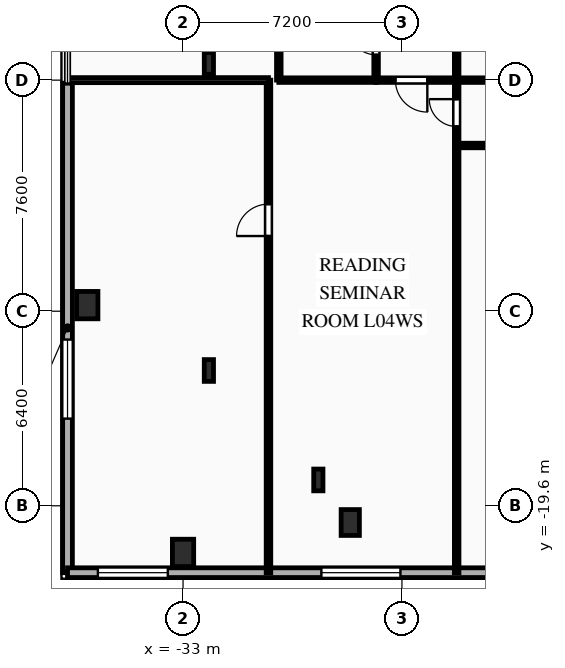
"""IFC4 building model, lengths in metres.
Left out: names, types, materials, properties, quantities, classifications, styles, units other than length and angle.
Written with IfcOpenShell. Run it as: python <this file> out.ifc"""

import sys

from ifc_helpers import new_model, si_unit, direction, frame, frame_2d, origin, origin_2d, place, context, subcontext, project, spatial, rectangle, i_section, extrude, element, fill, save


model = new_model("IFC4")
c1 = context("Model", 3, precision=1e-05, world=origin(), true_north=direction((0.0, 1.0)))
c2 = subcontext(c1, "Body", "Model", "MODEL_VIEW")
j1 = project(units=[si_unit("LENGTHUNIT", "METRE"), si_unit("PLANEANGLEUNIT", "RADIAN")], contexts=[c1])
p1 = place(None, origin())
s1 = spatial("IfcSite", under=j1, at=p1, CompositionType="ELEMENT")
p2 = place(p1, origin())
s2 = spatial("IfcBuilding", under=s1, at=p2, CompositionType="ELEMENT")
p3 = place(p2, frame((0.0, 0.0, 18.0)))
s3 = spatial("IfcBuildingStorey", under=s2, at=p3, CompositionType="ELEMENT", Elevation=18.0)
for number, where, z_axis, x_axis in (
    (1, (-33.0, -21.15, 0.0), (0.0, 0.0, 1.0), (1.0, 0.0, 0.0)),
    (2, (-36.15, -13.0, 0.0), (0.0, 0.0, 1.0), (1.0, 0.0, 0.0)),
):
    element("IfcColumn", number, at=place(p3, frame(where, z_axis=z_axis, x_axis=x_axis)), inside=s3, PredefinedType="COLUMN", context=c2, shape_type="SweptSolid", body=[
        extrude(rectangle(XDim=0.7, YDim=0.9, at=origin_2d()), origin(), (0.0, 0.0, 1.0), 4.5),
    ])
p4 = place(p3, frame((-27.5, -20.15, 0.0), z_axis=(0.0, 0.0, 1.0), x_axis=(1.0, 0.0, 0.0)))
e3 = element("IfcColumn", 3, at=p4, inside=s3, PredefinedType="PILASTER", context=c2, shape_type="SweptSolid", body=[
    extrude(rectangle(XDim=0.6, YDim=0.85, at=origin_2d()), origin(), (0.0, 0.0, 1.0), 4.5),
])
for number, where, z_axis, x_axis in (
    (4, (-28.55, -18.75, 0.0), (0.0, 0.0, 1.0), (1.0, 0.0, 0.0)),
    (5, (-32.15, -5.05, 0.0), (0.0, 0.0, 1.0), (1.0, 0.0, 0.0)),
    (6, (-32.15, -15.15, 0.0), (0.0, 0.0, 1.0), (1.0, 0.0, 0.0)),
):
    element("IfcColumn", number, at=place(p3, frame(where, z_axis=z_axis, x_axis=x_axis)), inside=s3, PredefinedType="COLUMN", context=c2, shape_type="SweptSolid", body=[
        extrude(i_section(OverallWidth=0.304, OverallDepth=0.716, WebThickness=0.021, FlangeThickness=0.04, FilletRadius=0.027, at=origin_2d()), origin(), (0.0, 0.0, 1.0), 4.5),
    ])
p5 = place(p3, frame((-36.8, -21.8, 0.0), z_axis=(0.0, 0.0, 1.0), x_axis=(0.0, 1.0, 0.0)))
e7 = element("IfcWall", 7, at=p5, inside=s3, PredefinedType="SOLIDWALL", context=c2, shape_type="SweptSolid", body=[
    extrude(rectangle(XDim=16.1, YDim=0.32, at=frame_2d((8.05, 0.0))), origin(), (0.0, 0.0, 1.0), 4.17),
])
p6 = place(p5, frame((5.067, 0.0, 0.85)))
e8 = element("IfcOpeningElement", 8, at=p6, cuts=e7, PredefinedType="OPENING", context=c2, shape_type="SweptSolid", body=[
    extrude(rectangle(XDim=2.6, YDim=2.4, at=frame_2d((1.3, 1.2))), frame((0.0, 0.17, 0.0), z_axis=(0.0, -1.0, 0.0), x_axis=(1.0, 0.0, 0.0)), (0.0, 0.0, 1.0), 0.34),
])
p7 = place(p3, frame((36.8, -21.8, 0.0), z_axis=(0.0, 0.0, 1.0), x_axis=(-1.0, 0.0, 0.0)))
e9 = element("IfcWall", 9, at=p7, inside=s3, PredefinedType="SOLIDWALL", context=c2, shape_type="SweptSolid", body=[
    extrude(rectangle(XDim=73.6, YDim=0.32, at=frame_2d((36.8, 0.0))), origin(), (0.0, 0.0, 1.0), 4.17),
])
p8 = place(p7, frame((1.079, 0.0, 0.85)))
e10 = element("IfcOpeningElement", 10, at=p8, cuts=e9, PredefinedType="OPENING", context=c2, shape_type="SweptSolid", body=[
    extrude(rectangle(XDim=2.3, YDim=2.4, at=frame_2d((1.15, 1.2))), frame((0.0, 0.17, 0.0), z_axis=(0.0, -1.0, 0.0), x_axis=(1.0, 0.0, 0.0)), (0.0, 0.0, 1.0), 0.34),
])
p9 = place(p7, frame((8.431, 0.0, 0.85)))
e11 = element("IfcOpeningElement", 11, at=p9, cuts=e9, PredefinedType="OPENING", context=c2, shape_type="SweptSolid", body=[
    extrude(rectangle(XDim=2.6, YDim=2.4, at=frame_2d((1.3, 1.2))), frame((0.0, 0.17, 0.0), z_axis=(0.0, -1.0, 0.0), x_axis=(1.0, 0.0, 0.0)), (0.0, 0.0, 1.0), 0.34),
])
p10 = place(p7, frame((13.324, 0.0, 0.85)))
e12 = element("IfcOpeningElement", 12, at=p10, cuts=e9, PredefinedType="OPENING", context=c2, shape_type="SweptSolid", body=[
    extrude(rectangle(XDim=1.1, YDim=1.85, at=frame_2d((0.55, 0.925))), frame((0.0, 0.17, 0.0), z_axis=(0.0, -1.0, 0.0), x_axis=(1.0, 0.0, 0.0)), (0.0, 0.0, 1.0), 0.34),
])
p11 = place(p7, frame((16.619, 0.0, 0.85)))
e13 = element("IfcOpeningElement", 13, at=p11, cuts=e9, PredefinedType="OPENING", context=c2, shape_type="SweptSolid", body=[
    extrude(rectangle(XDim=2.0, YDim=2.4, at=frame_2d((1.0, 1.2))), frame((0.0, 0.17, 0.0), z_axis=(0.0, -1.0, 0.0), x_axis=(1.0, 0.0, 0.0)), (0.0, 0.0, 1.0), 0.34),
])
p12 = place(p7, frame((21.125, 0.0, 0.85)))
e14 = element("IfcOpeningElement", 14, at=p12, cuts=e9, PredefinedType="OPENING", context=c2, shape_type="SweptSolid", body=[
    extrude(rectangle(XDim=2.6, YDim=2.4, at=frame_2d((1.3, 1.2))), frame((0.0, 0.17, 0.0), z_axis=(0.0, -1.0, 0.0), x_axis=(1.0, 0.0, 0.0)), (0.0, 0.0, 1.0), 0.34),
])
p13 = place(p7, frame((27.531, 0.0, 0.85)))
e15 = element("IfcOpeningElement", 15, at=p13, cuts=e9, PredefinedType="OPENING", context=c2, shape_type="SweptSolid", body=[
    extrude(rectangle(XDim=2.6, YDim=2.4, at=frame_2d((1.3, 1.2))), frame((0.0, 0.17, 0.0), z_axis=(0.0, -1.0, 0.0), x_axis=(1.0, 0.0, 0.0)), (0.0, 0.0, 1.0), 0.34),
])
p14 = place(p7, frame((33.474, 0.0, 0.85)))
e16 = element("IfcOpeningElement", 16, at=p14, cuts=e9, PredefinedType="OPENING", context=c2, shape_type="SweptSolid", body=[
    extrude(rectangle(XDim=2.6, YDim=2.4, at=frame_2d((1.3, 1.2))), frame((0.0, 0.17, 0.0), z_axis=(0.0, -1.0, 0.0), x_axis=(1.0, 0.0, 0.0)), (0.0, 0.0, 1.0), 0.34),
])
p15 = place(p7, frame((41.427, 0.0, 0.85)))
e17 = element("IfcOpeningElement", 17, at=p15, cuts=e9, PredefinedType="OPENING", context=c2, shape_type="SweptSolid", body=[
    extrude(rectangle(XDim=2.6, YDim=2.4, at=frame_2d((1.3, 1.2))), frame((0.0, 0.17, 0.0), z_axis=(0.0, -1.0, 0.0), x_axis=(1.0, 0.0, 0.0)), (0.0, 0.0, 1.0), 0.34),
])
p16 = place(p7, frame((48.177, 0.0, 0.85)))
e18 = element("IfcOpeningElement", 18, at=p16, cuts=e9, PredefinedType="OPENING", context=c2, shape_type="SweptSolid", body=[
    extrude(rectangle(XDim=2.0, YDim=2.4, at=frame_2d((1.0, 1.2))), frame((0.0, 0.17, 0.0), z_axis=(0.0, -1.0, 0.0), x_axis=(1.0, 0.0, 0.0)), (0.0, 0.0, 1.0), 0.34),
])
p17 = place(p7, frame((51.798, 0.0, 0.85)))
e19 = element("IfcOpeningElement", 19, at=p17, cuts=e9, PredefinedType="OPENING", context=c2, shape_type="SweptSolid", body=[
    extrude(rectangle(XDim=2.6, YDim=2.4, at=frame_2d((1.3, 1.2))), frame((0.0, 0.17, 0.0), z_axis=(0.0, -1.0, 0.0), x_axis=(1.0, 0.0, 0.0)), (0.0, 0.0, 1.0), 0.34),
])
p18 = place(p7, frame((56.111, 0.0, 0.85)))
e20 = element("IfcOpeningElement", 20, at=p18, cuts=e9, PredefinedType="OPENING", context=c2, shape_type="SweptSolid", body=[
    extrude(rectangle(XDim=2.3, YDim=2.4, at=frame_2d((1.15, 1.2))), frame((0.0, 0.17, 0.0), z_axis=(0.0, -1.0, 0.0), x_axis=(1.0, 0.0, 0.0)), (0.0, 0.0, 1.0), 0.34),
])
p19 = place(p7, frame((62.649, 0.0, 0.85)))
e21 = element("IfcOpeningElement", 21, at=p19, cuts=e9, PredefinedType="OPENING", context=c2, shape_type="SweptSolid", body=[
    extrude(rectangle(XDim=2.6, YDim=2.4, at=frame_2d((1.3, 1.2))), frame((0.0, 0.17, 0.0), z_axis=(0.0, -1.0, 0.0), x_axis=(1.0, 0.0, 0.0)), (0.0, 0.0, 1.0), 0.34),
])
p20 = place(p7, frame((70.301, 0.0, 0.85)))
e22 = element("IfcOpeningElement", 22, at=p20, cuts=e9, PredefinedType="OPENING", context=c2, shape_type="SweptSolid", body=[
    extrude(rectangle(XDim=2.3, YDim=2.4, at=frame_2d((1.15, 1.2))), frame((0.0, 0.17, 0.0), z_axis=(0.0, -1.0, 0.0), x_axis=(1.0, 0.0, 0.0)), (0.0, 0.0, 1.0), 0.34),
])
p21 = place(p3, frame((-24.0, -7.75, 0.0), z_axis=(0.0, 0.0, 1.0), x_axis=(0.0, 1.0, 0.0)))
e23 = element("IfcWall", 23, at=p21, inside=s3, PredefinedType="PARTITIONING", context=c2, shape_type="SweptSolid", body=[
    extrude(rectangle(XDim=2.15, YDim=0.15, at=frame_2d((1.075, 0.0))), origin(), (0.0, 0.0, 1.0), 4.17),
])
p22 = place(p21, frame((0.625, 0.0, 0.0)))
e24 = element("IfcOpeningElement", 24, at=p22, cuts=e23, PredefinedType="OPENING", context=c2, shape_type="SweptSolid", body=[
    extrude(rectangle(XDim=0.9, YDim=2.1, at=frame_2d((0.45, 1.05))), frame((0.0, 0.085, 0.0), z_axis=(0.0, -1.0, 0.0), x_axis=(1.0, 0.0, 0.0)), (0.0, 0.0, 1.0), 0.17),
])
p23 = place(p3, frame((-24.0, -5.6, 0.0), z_axis=(0.0, 0.0, 1.0), x_axis=(1.0, 0.0, 0.0)))
e25 = element("IfcWall", 25, at=p23, inside=s3, PredefinedType="PARTITIONING", context=c2, shape_type="SweptSolid", body=[
    extrude(rectangle(XDim=5.2, YDim=0.15, at=frame_2d((2.6, 0.0))), origin(), (0.0, 0.0, 1.0), 4.17),
])
p24 = place(p3, frame((-18.83, -7.75, 0.0), z_axis=(0.0, 0.0, 1.0), x_axis=(-1.0, 0.0, 0.0)))
e26 = element("IfcWall", 26, at=p24, inside=s3, PredefinedType="PARTITIONING", context=c2, shape_type="SweptSolid", body=[
    extrude(rectangle(XDim=5.17, YDim=0.15, at=frame_2d((2.585, 0.0))), origin(), (0.0, 0.0, 1.0), 4.17),
])
p25 = place(p24, frame((3.17, 0.0, 0.0)))
e27 = element("IfcOpeningElement", 27, at=p25, cuts=e26, PredefinedType="OPENING", context=c2, shape_type="SweptSolid", body=[
    extrude(rectangle(XDim=1.05, YDim=2.15, at=frame_2d((0.525, 1.075))), frame((0.0, 0.085, 0.0), z_axis=(0.0, -1.0, 0.0), x_axis=(1.0, 0.0, 0.0)), (0.0, 0.0, 1.0), 0.17),
])
p26 = place(p3, frame((-24.0, -5.6, 0.0), z_axis=(0.0, 0.0, 1.0), x_axis=(-1.0, 0.0, 0.0)))
e28 = element("IfcWall", 28, at=p26, inside=s3, PredefinedType="PARTITIONING", context=c2, shape_type="SweptSolid", body=[
    extrude(rectangle(XDim=2.65, YDim=0.15, at=frame_2d((1.325, 0.0))), origin(), (0.0, 0.0, 1.0), 4.17),
])
p27 = place(p26, frame((0.965, 0.0, 0.0)))
e29 = element("IfcOpeningElement", 29, at=p27, cuts=e28, PredefinedType="OPENING", context=c2, shape_type="SweptSolid", body=[
    extrude(rectangle(XDim=1.05, YDim=2.15, at=frame_2d((0.525, 1.075))), frame((0.0, 0.085, 0.0), z_axis=(0.0, -1.0, 0.0), x_axis=(1.0, 0.0, 0.0)), (0.0, 0.0, 1.0), 0.17),
])
p28 = place(p3, frame((-26.65, -5.6, 0.0), z_axis=(0.0, 0.0, 1.0), x_axis=(0.0, 1.0, 0.0)))
e30 = element("IfcWall", 30, at=p28, inside=s3, PredefinedType="PLUMBINGWALL", context=c2, shape_type="SweptSolid", body=[
    extrude(rectangle(XDim=2.35, YDim=0.15, at=frame_2d((1.175, 0.0))), origin(), (0.0, 0.0, 1.0), 4.17),
])
p29 = place(p28, frame((0.834, 0.0, 0.0)))
e31 = element("IfcOpeningElement", 31, at=p29, cuts=e30, PredefinedType="OPENING", context=c2, shape_type="SweptSolid", body=[
    extrude(rectangle(XDim=0.9, YDim=2.1, at=frame_2d((0.45, 1.05))), frame((0.0, 0.085, 0.0), z_axis=(0.0, -1.0, 0.0), x_axis=(1.0, 0.0, 0.0)), (0.0, 0.0, 1.0), 0.17),
])
p30 = place(p3, frame((-24.0, 8.5, 0.0), z_axis=(0.0, 0.0, 1.0), x_axis=(0.0, -1.0, 0.0)))
e32 = element("IfcWall", 32, at=p30, inside=s3, PredefinedType="PARTITIONING", context=c2, shape_type="SweptSolid", body=[
    extrude(rectangle(XDim=14.1, YDim=0.15, at=frame_2d((7.05, 0.0))), origin(), (0.0, 0.0, 1.0), 4.17),
])
p31 = place(p3, frame((-30.19, -21.8, 0.0), z_axis=(0.0, 0.0, 1.0), x_axis=(0.0, 1.0, 0.0)))
e33 = element("IfcWall", 33, at=p31, inside=s3, PredefinedType="PARTITIONING", context=c2, shape_type="SweptSolid", body=[
    extrude(rectangle(XDim=16.2, YDim=0.15, at=frame_2d((8.1, 0.0))), origin(), (0.0, 0.0, 1.0), 4.17),
])
p32 = place(p31, frame((11.073, 0.0, 0.0)))
e34 = element("IfcOpeningElement", 34, at=p32, cuts=e33, PredefinedType="OPENING", context=c2, shape_type="SweptSolid", body=[
    extrude(rectangle(XDim=1.05, YDim=2.15, at=frame_2d((0.525, 1.075))), frame((0.0, 0.085, 0.0), z_axis=(0.0, -1.0, 0.0), x_axis=(1.0, 0.0, 0.0)), (0.0, 0.0, 1.0), 0.17),
])
p33 = place(p3, frame((-29.85, -5.6, 0.0), z_axis=(0.0, 0.0, 1.0), x_axis=(1.0, 0.0, 0.0)))
e35 = element("IfcWall", 35, at=p33, inside=s3, PredefinedType="PLUMBINGWALL", context=c2, shape_type="SweptSolid", body=[
    extrude(rectangle(XDim=3.2, YDim=0.15, at=frame_2d((1.6, 0.0))), origin(), (0.0, 0.0, 1.0), 4.17),
])
p34 = place(p3, frame((-24.0, -7.75, 0.0), z_axis=(0.0, 0.0, 1.0), x_axis=(0.0, -1.0, 0.0)))
e36 = element("IfcWall", 36, at=p34, inside=s3, PredefinedType="PARTITIONING", context=c2, shape_type="SweptSolid", body=[
    extrude(rectangle(XDim=14.05, YDim=0.15, at=frame_2d((7.025, 0.0))), origin(), (0.0, 0.0, 1.0), 4.17),
])
p35 = place(p3, frame((-36.8, -5.6, 0.0), z_axis=(0.0, 0.0, 1.0), x_axis=(1.0, 0.0, 0.0)))
e37 = element("IfcWall", 37, at=p35, inside=s3, PredefinedType="PARTITIONING", context=c2, shape_type="SweptSolid", body=[
    extrude(rectangle(XDim=6.61, YDim=0.165, at=frame_2d((3.305, 0.0))), origin(), (0.0, 0.0, 1.0), 4.17),
])
p36 = place(p3, frame((-29.85, -5.6, 0.0), z_axis=(0.0, 0.0, 1.0), x_axis=(0.0, 1.0, 0.0)))
e38 = element("IfcWall", 38, at=p36, inside=s3, PredefinedType="PLUMBINGWALL", context=c2, shape_type="SweptSolid", body=[
    extrude(rectangle(XDim=2.35, YDim=0.15, at=frame_2d((1.175, 0.0))), origin(), (0.0, 0.0, 1.0), 4.17),
])
p37 = place(p6, origin())
e39 = element("IfcWindow", 39, at=p37, inside=s3, PartitioningType="SINGLE_PANEL", PredefinedType="WINDOW", context=c2, shape_type="SweptSolid", body=[
    extrude(rectangle(XDim=2.6, YDim=2.4, at=frame_2d((1.3, 1.2))), frame((0.0, 0.03, 0.0), z_axis=(0.0, -1.0, 0.0), x_axis=(1.0, 0.0, 0.0)), (0.0, 0.0, 1.0), 0.06),
])
fill(e8, e39)
p38 = place(p19, origin())
e40 = element("IfcWindow", 40, at=p38, inside=s3, PartitioningType="SINGLE_PANEL", PredefinedType="WINDOW", context=c2, shape_type="SweptSolid", body=[
    extrude(rectangle(XDim=2.6, YDim=2.4, at=frame_2d((1.3, 1.2))), frame((0.0, 0.03, 0.0), z_axis=(0.0, -1.0, 0.0), x_axis=(1.0, 0.0, 0.0)), (0.0, 0.0, 1.0), 0.06),
])
fill(e21, e40)
p39 = place(p20, origin())
e41 = element("IfcWindow", 41, at=p39, inside=s3, PartitioningType="SINGLE_PANEL", PredefinedType="WINDOW", context=c2, shape_type="SweptSolid", body=[
    extrude(rectangle(XDim=2.3, YDim=2.4, at=frame_2d((1.15, 1.2))), frame((0.0, 0.03, 0.0), z_axis=(0.0, -1.0, 0.0), x_axis=(1.0, 0.0, 0.0)), (0.0, 0.0, 1.0), 0.06),
])
fill(e22, e41)
p40 = place(p22, origin())
e42 = element("IfcDoor", 42, at=p40, inside=s3, OperationType="SINGLE_SWING_RIGHT", PredefinedType="DOOR", context=c2, shape_type="SweptSolid", body=[
    extrude(rectangle(XDim=0.9, YDim=2.1, at=frame_2d((0.45, 1.05))), frame((0.0, 0.025, 0.0), z_axis=(0.0, -1.0, 0.0), x_axis=(1.0, 0.0, 0.0)), (0.0, 0.0, 1.0), 0.05),
])
fill(e24, e42)
p41 = place(p27, origin())
e43 = element("IfcDoor", 43, at=p41, inside=s3, OperationType="SINGLE_SWING_LEFT", PredefinedType="DOOR", context=c2, shape_type="SweptSolid", body=[
    extrude(rectangle(XDim=1.05, YDim=2.15, at=frame_2d((0.525, 1.075))), frame((0.0, 0.025, 0.0), z_axis=(0.0, -1.0, 0.0), x_axis=(1.0, 0.0, 0.0)), (0.0, 0.0, 1.0), 0.05),
])
fill(e29, e43)
p42 = place(p29, origin())
e44 = element("IfcDoor", 44, at=p42, inside=s3, OperationType="SINGLE_SWING_RIGHT", PredefinedType="DOOR", context=c2, shape_type="SweptSolid", body=[
    extrude(rectangle(XDim=0.9, YDim=2.1, at=frame_2d((0.45, 1.05))), frame((0.0, 0.025, 0.0), z_axis=(0.0, -1.0, 0.0), x_axis=(1.0, 0.0, 0.0)), (0.0, 0.0, 1.0), 0.05),
])
fill(e31, e44)
p43 = place(p32, origin())
e45 = element("IfcDoor", 45, at=p43, inside=s3, OperationType="SINGLE_SWING_LEFT", PredefinedType="DOOR", context=c2, shape_type="SweptSolid", body=[
    extrude(rectangle(XDim=1.05, YDim=2.15, at=frame_2d((0.525, 1.075))), frame((0.0, 0.025, 0.0), z_axis=(0.0, -1.0, 0.0), x_axis=(1.0, 0.0, 0.0)), (0.0, 0.0, 1.0), 0.05),
])
fill(e34, e45)
save(model, sys.argv[1])
